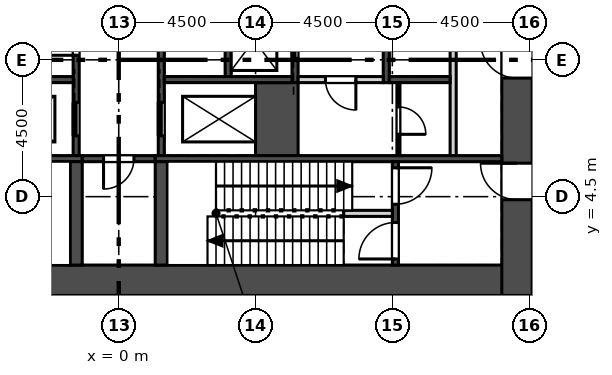
"""IFC4 building model, lengths in metres.
Left out: names, types, materials, properties, quantities, classifications, styles, units other than length and angle.
Written with IfcOpenShell. Run it as: python <this file> out.ifc"""

import sys

from ifc_helpers import new_model, si_unit, direction, frame, frame_2d, origin, place, context, subcontext, project, spatial, rectangle, extrude, element, fill, save


model = new_model("IFC4")
c1 = context("Model", 3, precision=1e-05, world=origin(), true_north=direction((0.0, 1.0)))
c2 = subcontext(c1, "Body", "Model", "MODEL_VIEW")
j1 = project(units=[si_unit("LENGTHUNIT", "METRE"), si_unit("PLANEANGLEUNIT", "RADIAN")], contexts=[c1])
p1 = place(None, origin())
s1 = spatial("IfcSite", under=j1, at=p1, CompositionType="ELEMENT")
p2 = place(p1, origin())
s2 = spatial("IfcBuilding", under=s1, at=p2, CompositionType="ELEMENT")
p3 = place(p2, frame((0.0, 0.0, 218.1)))
s3 = spatial("IfcBuildingStorey", under=s2, at=p3, CompositionType="ELEMENT", Elevation=218.1)
p4 = place(p3, frame((-13.6, 1.75, 0.0), z_axis=(0.0, 0.0, 1.0), x_axis=(1.0, 0.0, 0.0)))
e1 = element("IfcWall", 1, at=p4, inside=s3, PredefinedType="SHEAR", context=c2, shape_type="SweptSolid", body=[
    extrude(rectangle(XDim=27.2, YDim=1.0, at=frame_2d((13.6, 0.0))), origin(), (0.0, 0.0, 1.0), 5.4),
])
p5 = place(p3, frame((13.1, 1.25, 0.0), z_axis=(0.0, 0.0, 1.0), x_axis=(0.0, 1.0, 0.0)))
e2 = element("IfcWall", 2, at=p5, inside=s3, PredefinedType="SHEAR", context=c2, shape_type="SweptSolid", body=[
    extrude(rectangle(XDim=9.695, YDim=1.0, at=frame_2d((4.848, 0.0))), origin(), (0.0, 0.0, 1.0), 5.4),
])
p6 = place(p5, frame((3.15, 0.0, 0.0)))
e3 = element("IfcOpeningElement", 3, at=p6, cuts=e2, PredefinedType="OPENING", context=c2, shape_type="SweptSolid", body=[
    extrude(rectangle(XDim=1.2, YDim=2.1, at=frame_2d((0.6, 1.05))), frame((0.0, 0.51, 0.0), z_axis=(0.0, -1.0, 0.0), x_axis=(1.0, 0.0, 0.0)), (0.0, 0.0, 1.0), 1.02),
])
p7 = place(p5, frame((7.15, 0.0, 0.0)))
e4 = element("IfcOpeningElement", 4, at=p7, cuts=e2, PredefinedType="OPENING", context=c2, shape_type="SweptSolid", body=[
    extrude(rectangle(XDim=1.2, YDim=2.1, at=frame_2d((0.6, 1.05))), frame((0.0, 0.51, 0.0), z_axis=(0.0, -1.0, 0.0), x_axis=(1.0, 0.0, 0.0)), (0.0, 0.0, 1.0), 1.02),
])
p8 = place(p3, frame((27.139, 7.709, 0.0), z_axis=(0.0, 0.0, 1.0), x_axis=(-0.500000533701, 0.866025095652, 0.0)))
e5 = element("IfcWall", 5, at=p8, inside=s3, PredefinedType="SOLIDWALL", context=c2, shape_type="SweptSolid", body=[
    extrude(rectangle(XDim=45.573, YDim=0.34, at=frame_2d((22.787, 0.0))), origin(), (0.0, 0.0, 1.0), 5.0),
])
p9 = place(p8, frame((1.893, 0.0, 0.9)))
e6 = element("IfcOpeningElement", 6, at=p9, cuts=e5, PredefinedType="OPENING", context=c2, shape_type="SweptSolid", body=[
    extrude(rectangle(XDim=1.885, YDim=3.0, at=frame_2d((0.942, 1.5))), frame((0.0, 0.18, 0.0), z_axis=(0.0, -1.0, 0.0), x_axis=(1.0, 0.0, 0.0)), (0.0, 0.0, 1.0), 0.36),
])
p10 = place(p8, frame((4.893, 0.0, 0.9)))
e7 = element("IfcOpeningElement", 7, at=p10, cuts=e5, PredefinedType="OPENING", context=c2, shape_type="SweptSolid", body=[
    extrude(rectangle(XDim=1.885, YDim=3.0, at=frame_2d((0.942, 1.5))), frame((0.0, 0.18, 0.0), z_axis=(0.0, -1.0, 0.0), x_axis=(1.0, 0.0, 0.0)), (0.0, 0.0, 1.0), 0.36),
])
p11 = place(p8, frame((7.893, 0.0, 0.9)))
e8 = element("IfcOpeningElement", 8, at=p11, cuts=e5, PredefinedType="OPENING", context=c2, shape_type="SweptSolid", body=[
    extrude(rectangle(XDim=1.885, YDim=3.0, at=frame_2d((0.942, 1.5))), frame((0.0, 0.18, 0.0), z_axis=(0.0, -1.0, 0.0), x_axis=(1.0, 0.0, 0.0)), (0.0, 0.0, 1.0), 0.36),
])
p12 = place(p8, frame((10.893, 0.0, 0.9)))
e9 = element("IfcOpeningElement", 9, at=p12, cuts=e5, PredefinedType="OPENING", context=c2, shape_type="SweptSolid", body=[
    extrude(rectangle(XDim=1.885, YDim=3.0, at=frame_2d((0.942, 1.5))), frame((0.0, 0.18, 0.0), z_axis=(0.0, -1.0, 0.0), x_axis=(1.0, 0.0, 0.0)), (0.0, 0.0, 1.0), 0.36),
])
p13 = place(p8, frame((13.893, 0.0, 0.9)))
e10 = element("IfcOpeningElement", 10, at=p13, cuts=e5, PredefinedType="OPENING", context=c2, shape_type="SweptSolid", body=[
    extrude(rectangle(XDim=1.885, YDim=3.0, at=frame_2d((0.942, 1.5))), frame((0.0, 0.18, 0.0), z_axis=(0.0, -1.0, 0.0), x_axis=(1.0, 0.0, 0.0)), (0.0, 0.0, 1.0), 0.36),
])
p14 = place(p8, frame((16.893, 0.0, 0.9)))
e11 = element("IfcOpeningElement", 11, at=p14, cuts=e5, PredefinedType="OPENING", context=c2, shape_type="SweptSolid", body=[
    extrude(rectangle(XDim=1.885, YDim=3.0, at=frame_2d((0.942, 1.5))), frame((0.0, 0.18, 0.0), z_axis=(0.0, -1.0, 0.0), x_axis=(1.0, 0.0, 0.0)), (0.0, 0.0, 1.0), 0.36),
])
p15 = place(p8, frame((19.893, 0.0, 0.9)))
e12 = element("IfcOpeningElement", 12, at=p15, cuts=e5, PredefinedType="OPENING", context=c2, shape_type="SweptSolid", body=[
    extrude(rectangle(XDim=1.885, YDim=3.0, at=frame_2d((0.942, 1.5))), frame((0.0, 0.18, 0.0), z_axis=(0.0, -1.0, 0.0), x_axis=(1.0, 0.0, 0.0)), (0.0, 0.0, 1.0), 0.36),
])
p16 = place(p8, frame((22.893, 0.0, 0.9)))
e13 = element("IfcOpeningElement", 13, at=p16, cuts=e5, PredefinedType="OPENING", context=c2, shape_type="SweptSolid", body=[
    extrude(rectangle(XDim=1.885, YDim=3.0, at=frame_2d((0.942, 1.5))), frame((0.0, 0.18, 0.0), z_axis=(0.0, -1.0, 0.0), x_axis=(1.0, 0.0, 0.0)), (0.0, 0.0, 1.0), 0.36),
])
p17 = place(p8, frame((25.893, 0.0, 0.9)))
e14 = element("IfcOpeningElement", 14, at=p17, cuts=e5, PredefinedType="OPENING", context=c2, shape_type="SweptSolid", body=[
    extrude(rectangle(XDim=1.885, YDim=3.0, at=frame_2d((0.942, 1.5))), frame((0.0, 0.18, 0.0), z_axis=(0.0, -1.0, 0.0), x_axis=(1.0, 0.0, 0.0)), (0.0, 0.0, 1.0), 0.36),
])
p18 = place(p8, frame((28.893, 0.0, 0.9)))
e15 = element("IfcOpeningElement", 15, at=p18, cuts=e5, PredefinedType="OPENING", context=c2, shape_type="SweptSolid", body=[
    extrude(rectangle(XDim=1.885, YDim=3.0, at=frame_2d((0.942, 1.5))), frame((0.0, 0.18, 0.0), z_axis=(0.0, -1.0, 0.0), x_axis=(1.0, 0.0, 0.0)), (0.0, 0.0, 1.0), 0.36),
])
p19 = place(p8, frame((31.893, 0.0, 0.9)))
e16 = element("IfcOpeningElement", 16, at=p19, cuts=e5, PredefinedType="OPENING", context=c2, shape_type="SweptSolid", body=[
    extrude(rectangle(XDim=1.885, YDim=3.0, at=frame_2d((0.942, 1.5))), frame((0.0, 0.18, 0.0), z_axis=(0.0, -1.0, 0.0), x_axis=(1.0, 0.0, 0.0)), (0.0, 0.0, 1.0), 0.36),
])
p20 = place(p8, frame((34.893, 0.0, 0.9)))
e17 = element("IfcOpeningElement", 17, at=p20, cuts=e5, PredefinedType="OPENING", context=c2, shape_type="SweptSolid", body=[
    extrude(rectangle(XDim=1.885, YDim=3.0, at=frame_2d((0.942, 1.5))), frame((0.0, 0.18, 0.0), z_axis=(0.0, -1.0, 0.0), x_axis=(1.0, 0.0, 0.0)), (0.0, 0.0, 1.0), 0.36),
])
p21 = place(p8, frame((37.893, 0.0, 0.9)))
e18 = element("IfcOpeningElement", 18, at=p21, cuts=e5, PredefinedType="OPENING", context=c2, shape_type="SweptSolid", body=[
    extrude(rectangle(XDim=1.885, YDim=3.0, at=frame_2d((0.942, 1.5))), frame((0.0, 0.18, 0.0), z_axis=(0.0, -1.0, 0.0), x_axis=(1.0, 0.0, 0.0)), (0.0, 0.0, 1.0), 0.36),
])
p22 = place(p8, frame((40.893, 0.0, 0.9)))
e19 = element("IfcOpeningElement", 19, at=p22, cuts=e5, PredefinedType="OPENING", context=c2, shape_type="SweptSolid", body=[
    extrude(rectangle(XDim=1.885, YDim=3.0, at=frame_2d((0.942, 1.5))), frame((0.0, 0.18, 0.0), z_axis=(0.0, -1.0, 0.0), x_axis=(1.0, 0.0, 0.0)), (0.0, 0.0, 1.0), 0.36),
])
p23 = place(p3, frame((11.0, 5.85, 0.0), z_axis=(0.0, 0.0, 1.0), x_axis=(0.0, 1.0, 0.0)))
e20 = element("IfcWall", 20, at=p23, inside=s3, PredefinedType="SOLIDWALL", context=c2, shape_type="SweptSolid", body=[
    extrude(rectangle(XDim=7.4, YDim=0.2, at=frame_2d((3.7, 0.0))), origin(), (0.0, 0.0, 1.0), 5.0),
])
p24 = place(p3, frame((8.8, 8.25, -0.4), z_axis=(0.0, 0.0, 1.0), x_axis=(0.0, 1.0, 0.0)))
e21 = element("IfcWall", 21, at=p24, inside=s3, PredefinedType="SOLIDWALL", context=c2, shape_type="SweptSolid", body=[
    extrude(rectangle(XDim=5.2, YDim=0.2, at=frame_2d((2.6, 0.0))), origin(), (0.0, 0.0, 1.0), 5.4),
])
p25 = place(p3, frame((5.8, 8.25, -0.4), z_axis=(0.0, 0.0, 1.0), x_axis=(0.0, 1.0, 0.0)))
e22 = element("IfcWall", 22, at=p25, inside=s3, PredefinedType="SOLIDWALL", context=c2, shape_type="SweptSolid", body=[
    extrude(rectangle(XDim=8.0, YDim=0.2, at=frame_2d((4.0, 0.0))), origin(), (0.0, 0.0, 1.0), 5.4),
])
p26 = place(p25, frame((0.8, 0.0, 0.4)))
e23 = element("IfcOpeningElement", 23, at=p26, cuts=e22, PredefinedType="OPENING", context=c2, shape_type="SweptSolid", body=[
    extrude(rectangle(XDim=1.2, YDim=2.1, at=frame_2d((0.6, 1.05))), frame((0.0, 0.11, 0.0), z_axis=(0.0, -1.0, 0.0), x_axis=(1.0, 0.0, 0.0)), (0.0, 0.0, 1.0), 0.22),
])
p27 = place(p25, frame((3.4, 0.0, 0.4)))
e24 = element("IfcOpeningElement", 24, at=p27, cuts=e22, PredefinedType="OPENING", context=c2, shape_type="SweptSolid", body=[
    extrude(rectangle(XDim=1.2, YDim=2.1, at=frame_2d((0.6, 1.05))), frame((0.0, 0.11, 0.0), z_axis=(0.0, -1.0, 0.0), x_axis=(1.0, 0.0, 0.0)), (0.0, 0.0, 1.0), 0.22),
])
p28 = place(p25, frame((6.0, 0.0, 0.4)))
e25 = element("IfcOpeningElement", 25, at=p28, cuts=e22, PredefinedType="OPENING", context=c2, shape_type="SweptSolid", body=[
    extrude(rectangle(XDim=1.2, YDim=2.1, at=frame_2d((0.6, 1.05))), frame((0.0, 0.11, 0.0), z_axis=(0.0, -1.0, 0.0), x_axis=(1.0, 0.0, 0.0)), (0.0, 0.0, 1.0), 0.22),
])
p29 = place(p3, frame((3.6, 8.45, -0.4), z_axis=(0.0, 0.0, 1.0), x_axis=(0.0, 1.0, 0.0)))
e26 = element("IfcWall", 26, at=p29, inside=s3, PredefinedType="SOLIDWALL", context=c2, shape_type="SweptSolid", body=[
    extrude(rectangle(XDim=7.8, YDim=0.2, at=frame_2d((3.9, 0.0))), origin(), (0.0, 0.0, 1.0), 5.4),
])
p30 = place(p3, frame((-1.4, 5.85, -0.4), z_axis=(0.0, 0.0, 1.0), x_axis=(0.0, 1.0, 0.0)))
e27 = element("IfcWall", 27, at=p30, inside=s3, PredefinedType="SOLIDWALL", context=c2, shape_type="SweptSolid", body=[
    extrude(rectangle(XDim=11.75, YDim=0.2, at=frame_2d((5.875, 0.0))), origin(), (0.0, 0.0, 1.0), 5.4),
])
p31 = place(p30, frame((0.65, 0.0, 0.4)))
e28 = element("IfcOpeningElement", 28, at=p31, cuts=e27, PredefinedType="OPENING", context=c2, shape_type="SweptSolid", body=[
    extrude(rectangle(XDim=1.1, YDim=2.1, at=frame_2d((0.55, 1.05))), frame((0.0, 0.11, 0.0), z_axis=(0.0, -1.0, 0.0), x_axis=(1.0, 0.0, 0.0)), (0.0, 0.0, 1.0), 0.22),
])
p32 = place(p30, frame((3.3, 0.0, 0.4)))
e29 = element("IfcOpeningElement", 29, at=p32, cuts=e27, PredefinedType="OPENING", context=c2, shape_type="SweptSolid", body=[
    extrude(rectangle(XDim=1.0, YDim=2.1, at=frame_2d((0.5, 1.05))), frame((0.0, 0.11, 0.0), z_axis=(0.0, -1.0, 0.0), x_axis=(1.0, 0.0, 0.0)), (0.0, 0.0, 1.0), 0.22),
])
p33 = place(p30, frame((5.4, 0.0, 0.4)))
e30 = element("IfcOpeningElement", 30, at=p33, cuts=e27, PredefinedType="OPENING", context=c2, shape_type="SweptSolid", body=[
    extrude(rectangle(XDim=1.0, YDim=2.1, at=frame_2d((0.5, 1.05))), frame((0.0, 0.11, 0.0), z_axis=(0.0, -1.0, 0.0), x_axis=(1.0, 0.0, 0.0)), (0.0, 0.0, 1.0), 0.22),
])
p34 = place(p3, frame((1.4, 5.85, -0.4), z_axis=(0.0, 0.0, 1.0), x_axis=(0.0, 1.0, 0.0)))
e31 = element("IfcWall", 31, at=p34, inside=s3, PredefinedType="SOLIDWALL", context=c2, shape_type="SweptSolid", body=[
    extrude(rectangle(XDim=11.75, YDim=0.2, at=frame_2d((5.875, 0.0))), origin(), (0.0, 0.0, 1.0), 5.4),
])
p35 = place(p34, frame((0.65, 0.0, 0.4)))
e32 = element("IfcOpeningElement", 32, at=p35, cuts=e31, PredefinedType="OPENING", context=c2, shape_type="SweptSolid", body=[
    extrude(rectangle(XDim=1.1, YDim=2.1, at=frame_2d((0.55, 1.05))), frame((0.0, 0.11, 0.0), z_axis=(0.0, -1.0, 0.0), x_axis=(1.0, 0.0, 0.0)), (0.0, 0.0, 1.0), 0.22),
])
p36 = place(p34, frame((5.9, 0.0, 0.4)))
e33 = element("IfcOpeningElement", 33, at=p36, cuts=e31, PredefinedType="OPENING", context=c2, shape_type="SweptSolid", body=[
    extrude(rectangle(XDim=1.0, YDim=2.1, at=frame_2d((0.5, 1.05))), frame((0.0, 0.11, 0.0), z_axis=(0.0, -1.0, 0.0), x_axis=(1.0, 0.0, 0.0)), (0.0, 0.0, 1.0), 0.22),
])
p37 = place(p3, frame((5.2, 5.85, -0.4), z_axis=(0.0, 0.0, 1.0), x_axis=(0.0, 1.0, 0.0)))
e34 = element("IfcWall", 34, at=p37, inside=s3, PredefinedType="SOLIDWALL", context=c2, shape_type="SweptSolid", body=[
    extrude(rectangle(XDim=2.4, YDim=1.4, at=frame_2d((1.2, 0.0))), origin(), (0.0, 0.0, 1.0), 5.4),
])
p38 = place(p3, frame((8.9, 8.35, -0.4), z_axis=(0.0, 0.0, 1.0), x_axis=(1.0, 0.0, 0.0)))
e35 = element("IfcWall", 35, at=p38, inside=s3, PredefinedType="SOLIDWALL", context=c2, shape_type="SweptSolid", body=[
    extrude(rectangle(XDim=2.0, YDim=0.2, at=frame_2d((1.0, 0.0))), origin(), (0.0, 0.0, 1.0), 5.4),
])
for number, where, z_axis, x_axis in (
    (36, (-5.7, 8.35, -0.4), (0.0, 0.0, 1.0), (1.0, 0.0, 0.0)),
    (37, (1.5, 8.35, -0.4), (0.0, 0.0, 1.0), (1.0, 0.0, 0.0)),
):
    element("IfcWall", number, at=place(p3, frame(where, z_axis=z_axis, x_axis=x_axis)), inside=s3, PredefinedType="SOLIDWALL", context=c2, shape_type="SweptSolid", body=[
        extrude(rectangle(XDim=4.2, YDim=0.2, at=frame_2d((2.1, 0.0))), origin(), (0.0, 0.0, 1.0), 5.4),
    ])
p39 = place(p3, frame((-12.6, 5.75, -0.4), z_axis=(0.0, 0.0, 1.0), x_axis=(1.0, 0.0, 0.0)))
e38 = element("IfcWall", 38, at=p39, inside=s3, PredefinedType="SOLIDWALL", context=c2, shape_type="SweptSolid", body=[
    extrude(rectangle(XDim=11.4, YDim=0.2, at=frame_2d((5.7, 0.0))), origin(), (0.0, 0.0, 1.0), 5.4),
])
p40 = place(p3, frame((-1.2, 5.75, -0.4), z_axis=(0.0, 0.0, 1.0), x_axis=(1.0, 0.0, 0.0)))
e39 = element("IfcWall", 39, at=p40, inside=s3, PredefinedType="SOLIDWALL", context=c2, shape_type="SweptSolid", body=[
    extrude(rectangle(XDim=2.4, YDim=0.2, at=frame_2d((1.2, 0.0))), origin(), (0.0, 0.0, 1.0), 5.4),
])
p41 = place(p40, frame((0.7, 0.0, 0.4)))
e40 = element("IfcOpeningElement", 40, at=p41, cuts=e39, PredefinedType="OPENING", context=c2, shape_type="SweptSolid", body=[
    extrude(rectangle(XDim=1.0, YDim=2.1, at=frame_2d((0.5, 1.05))), frame((0.0, 0.11, 0.0), z_axis=(0.0, -1.0, 0.0), x_axis=(1.0, 0.0, 0.0)), (0.0, 0.0, 1.0), 0.22),
])
p42 = place(p3, frame((1.2, 5.75, -0.4), z_axis=(0.0, 0.0, 1.0), x_axis=(1.0, 0.0, 0.0)))
e41 = element("IfcWall", 41, at=p42, inside=s3, PredefinedType="SOLIDWALL", context=c2, shape_type="SweptSolid", body=[
    extrude(rectangle(XDim=11.4, YDim=0.2, at=frame_2d((5.7, 0.0))), origin(), (0.0, 0.0, 1.0), 5.4),
])
p43 = place(p3, frame((9.1, 2.25, -0.4), z_axis=(0.0, 0.0, 1.0), x_axis=(0.0, 1.0, 0.0)))
e42 = element("IfcWall", 42, at=p43, inside=s3, PredefinedType="SOLIDWALL", context=c2, shape_type="SweptSolid", body=[
    extrude(rectangle(XDim=3.4, YDim=0.2, at=frame_2d((1.7, 0.0))), origin(), (0.0, 0.0, 1.0), 5.4),
])
p44 = place(p43, frame((0.2, 0.0, 0.4)))
e43 = element("IfcOpeningElement", 43, at=p44, cuts=e42, PredefinedType="OPENING", context=c2, shape_type="SweptSolid", body=[
    extrude(rectangle(XDim=1.2, YDim=2.1, at=frame_2d((0.6, 1.05))), frame((0.0, 0.11, 0.0), z_axis=(0.0, -1.0, 0.0), x_axis=(1.0, 0.0, 0.0)), (0.0, 0.0, 1.0), 0.22),
])
p45 = place(p43, frame((2.0, 0.0, 0.4)))
e44 = element("IfcOpeningElement", 44, at=p45, cuts=e42, PredefinedType="OPENING", context=c2, shape_type="SweptSolid", body=[
    extrude(rectangle(XDim=1.2, YDim=2.1, at=frame_2d((0.6, 1.05))), frame((0.0, 0.11, 0.0), z_axis=(0.0, -1.0, 0.0), x_axis=(1.0, 0.0, 0.0)), (0.0, 0.0, 1.0), 0.22),
])
for number, where, z_axis, x_axis in (
    (45, (-1.4, 2.25, -0.4), (0.0, 0.0, 1.0), (0.0, 1.0, 0.0)),
    (46, (1.4, 2.25, -0.4), (0.0, 0.0, 1.0), (0.0, 1.0, 0.0)),
):
    element("IfcWall", number, at=place(p3, frame(where, z_axis=z_axis, x_axis=x_axis)), inside=s3, PredefinedType="SOLIDWALL", context=c2, shape_type="SweptSolid", body=[
        extrude(rectangle(XDim=3.4, YDim=0.4, at=frame_2d((1.7, 0.0))), origin(), (0.0, 0.0, 1.0), 5.4),
    ])
p46 = place(p3, frame((9.2, 5.85, 0.0), z_axis=(0.0, 0.0, 1.0), x_axis=(0.0, 1.0, 0.0)))
e47 = element("IfcWall", 47, at=p46, inside=s3, PredefinedType="PARTITIONING", context=c2, shape_type="SweptSolid", body=[
    extrude(rectangle(XDim=2.4, YDim=0.1, at=frame_2d((1.2, 0.0))), origin(), (0.0, 0.0, 1.0), 5.0),
])
p47 = place(p46, frame((0.7, 0.0, 0.0)))
e48 = element("IfcOpeningElement", 48, at=p47, cuts=e47, PredefinedType="OPENING", context=c2, shape_type="SweptSolid", body=[
    extrude(rectangle(XDim=0.9, YDim=2.1, at=frame_2d((0.45, 1.05))), frame((0.0, 0.06, 0.0), z_axis=(0.0, -1.0, 0.0), x_axis=(1.0, 0.0, 0.0)), (0.0, 0.0, 1.0), 0.12),
])
p48 = place(p3, frame((5.9, 8.35, 0.0), z_axis=(0.0, 0.0, 1.0), x_axis=(1.0, 0.0, 0.0)))
e49 = element("IfcWall", 49, at=p48, inside=s3, PredefinedType="SOLIDWALL", context=c2, shape_type="SweptSolid", body=[
    extrude(rectangle(XDim=2.8, YDim=0.2, at=frame_2d((1.4, 0.0))), origin(), (0.0, 0.0, 1.0), 5.0),
])
p49 = place(p48, frame((0.9, 0.0, 0.0)))
e50 = element("IfcOpeningElement", 50, at=p49, cuts=e49, PredefinedType="OPENING", context=c2, shape_type="SweptSolid", body=[
    extrude(rectangle(XDim=1.0, YDim=2.1, at=frame_2d((0.5, 1.05))), frame((0.0, 0.11, 0.0), z_axis=(0.0, -1.0, 0.0), x_axis=(1.0, 0.0, 0.0)), (0.0, 0.0, 1.0), 0.22),
])
p50 = place(p3, frame((7.4, 3.95, 0.0), z_axis=(0.0, 0.0, 1.0), x_axis=(1.0, 0.0, 0.0)))
e51 = element("IfcWall", 51, at=p50, inside=s3, PredefinedType="SOLIDWALL", context=c2, shape_type="SweptSolid", body=[
    extrude(rectangle(XDim=1.6, YDim=0.2, at=frame_2d((0.8, 0.0))), origin(), (0.0, 0.0, 1.0), 5.0),
])
p51 = place(p31, origin())
e52 = element("IfcDoor", 52, at=p51, inside=s3, OperationType="SLIDING_TO_RIGHT", PredefinedType="DOOR", context=c2, shape_type="SweptSolid", body=[
    extrude(rectangle(XDim=1.1, YDim=2.1, at=frame_2d((0.55, 1.05))), frame((0.0, 0.025, 0.0), z_axis=(0.0, -1.0, 0.0), x_axis=(1.0, 0.0, 0.0)), (0.0, 0.0, 1.0), 0.05),
])
fill(e28, e52)
p52 = place(p26, origin())
e53 = element("IfcDoor", 53, at=p52, inside=s3, OperationType="SLIDING_TO_LEFT", PredefinedType="DOOR", context=c2, shape_type="SweptSolid", body=[
    extrude(rectangle(XDim=1.2, YDim=2.1, at=frame_2d((0.6, 1.05))), frame((0.0, 0.025, 0.0), z_axis=(0.0, -1.0, 0.0), x_axis=(1.0, 0.0, 0.0)), (0.0, 0.0, 1.0), 0.05),
])
fill(e23, e53)
p53 = place(p35, origin())
e54 = element("IfcDoor", 54, at=p53, inside=s3, OperationType="SLIDING_TO_RIGHT", PredefinedType="DOOR", context=c2, shape_type="SweptSolid", body=[
    extrude(rectangle(XDim=1.1, YDim=2.1, at=frame_2d((0.55, 1.05))), frame((0.0, 0.025, 0.0), z_axis=(0.0, -1.0, 0.0), x_axis=(1.0, 0.0, 0.0)), (0.0, 0.0, 1.0), 0.05),
])
fill(e32, e54)
p54 = place(p32, origin())
e55 = element("IfcDoor", 55, at=p54, inside=s3, OperationType="SINGLE_SWING_LEFT", PredefinedType="DOOR", context=c2, shape_type="SweptSolid", body=[
    extrude(rectangle(XDim=1.0, YDim=2.1, at=frame_2d((0.5, 1.05))), frame((0.0, 0.025, 0.0), z_axis=(0.0, -1.0, 0.0), x_axis=(1.0, 0.0, 0.0)), (0.0, 0.0, 1.0), 0.05),
])
fill(e29, e55)
p55 = place(p41, frame((1.0, 0.0, 0.0), z_axis=(0.0, 0.0, 1.0), x_axis=(-1.0, 0.0, 0.0)))
e56 = element("IfcDoor", 56, at=p55, inside=s3, OperationType="SINGLE_SWING_RIGHT", PredefinedType="DOOR", context=c2, shape_type="SweptSolid", body=[
    extrude(rectangle(XDim=1.0, YDim=2.1, at=frame_2d((0.5, 1.05))), frame((0.0, 0.025, 0.0), z_axis=(0.0, -1.0, 0.0), x_axis=(1.0, 0.0, 0.0)), (0.0, 0.0, 1.0), 0.05),
])
fill(e40, e56)
p56 = place(p49, frame((1.0, 0.0, 0.0), z_axis=(0.0, 0.0, 1.0), x_axis=(-1.0, 0.0, 0.0)))
e57 = element("IfcDoor", 57, at=p56, inside=s3, OperationType="SINGLE_SWING_LEFT", PredefinedType="DOOR", context=c2, shape_type="SweptSolid", body=[
    extrude(rectangle(XDim=1.0, YDim=2.1, at=frame_2d((0.5, 1.05))), frame((0.0, 0.025, 0.0), z_axis=(0.0, -1.0, 0.0), x_axis=(1.0, 0.0, 0.0)), (0.0, 0.0, 1.0), 0.05),
])
fill(e50, e57)
p57 = place(p47, frame((0.9, 0.0, 0.0), z_axis=(0.0, 0.0, 1.0), x_axis=(-1.0, 0.0, 0.0)))
e58 = element("IfcDoor", 58, at=p57, inside=s3, OperationType="SINGLE_SWING_RIGHT", PredefinedType="DOOR", context=c2, shape_type="SweptSolid", body=[
    extrude(rectangle(XDim=0.9, YDim=2.1, at=frame_2d((0.45, 1.05))), frame((0.0, 0.025, 0.0), z_axis=(0.0, -1.0, 0.0), x_axis=(1.0, 0.0, 0.0)), (0.0, 0.0, 1.0), 0.05),
])
fill(e48, e58)
p58 = place(p6, origin())
e59 = element("IfcDoor", 59, at=p58, inside=s3, OperationType="SINGLE_SWING_RIGHT", PredefinedType="DOOR", context=c2, shape_type="SweptSolid", body=[
    extrude(rectangle(XDim=1.2, YDim=2.1, at=frame_2d((0.6, 1.05))), frame((0.0, 0.025, 0.0), z_axis=(0.0, -1.0, 0.0), x_axis=(1.0, 0.0, 0.0)), (0.0, 0.0, 1.0), 0.05),
])
fill(e3, e59)
p59 = place(p44, origin())
e60 = element("IfcDoor", 60, at=p59, inside=s3, OperationType="SINGLE_SWING_LEFT", PredefinedType="DOOR", context=c2, shape_type="SweptSolid", body=[
    extrude(rectangle(XDim=1.2, YDim=2.1, at=frame_2d((0.6, 1.05))), frame((0.0, 0.025, 0.0), z_axis=(0.0, -1.0, 0.0), x_axis=(1.0, 0.0, 0.0)), (0.0, 0.0, 1.0), 0.05),
])
fill(e43, e60)
p60 = place(p7, origin())
e61 = element("IfcDoor", 61, at=p60, inside=s3, OperationType="SINGLE_SWING_RIGHT", PredefinedType="DOOR", context=c2, shape_type="SweptSolid", body=[
    extrude(rectangle(XDim=1.2, YDim=2.1, at=frame_2d((0.6, 1.05))), frame((0.0, 0.025, 0.0), z_axis=(0.0, -1.0, 0.0), x_axis=(1.0, 0.0, 0.0)), (0.0, 0.0, 1.0), 0.05),
])
fill(e4, e61)
p61 = place(p45, frame((1.2, 0.0, 0.0), z_axis=(0.0, 0.0, 1.0), x_axis=(-1.0, 0.0, 0.0)))
e62 = element("IfcDoor", 62, at=p61, inside=s3, OperationType="SINGLE_SWING_LEFT", PredefinedType="DOOR", context=c2, shape_type="SweptSolid", body=[
    extrude(rectangle(XDim=1.2, YDim=2.1, at=frame_2d((0.6, 1.05))), frame((0.0, 0.025, 0.0), z_axis=(0.0, -1.0, 0.0), x_axis=(1.0, 0.0, 0.0)), (0.0, 0.0, 1.0), 0.05),
])
fill(e44, e62)
save(model, sys.argv[1])
